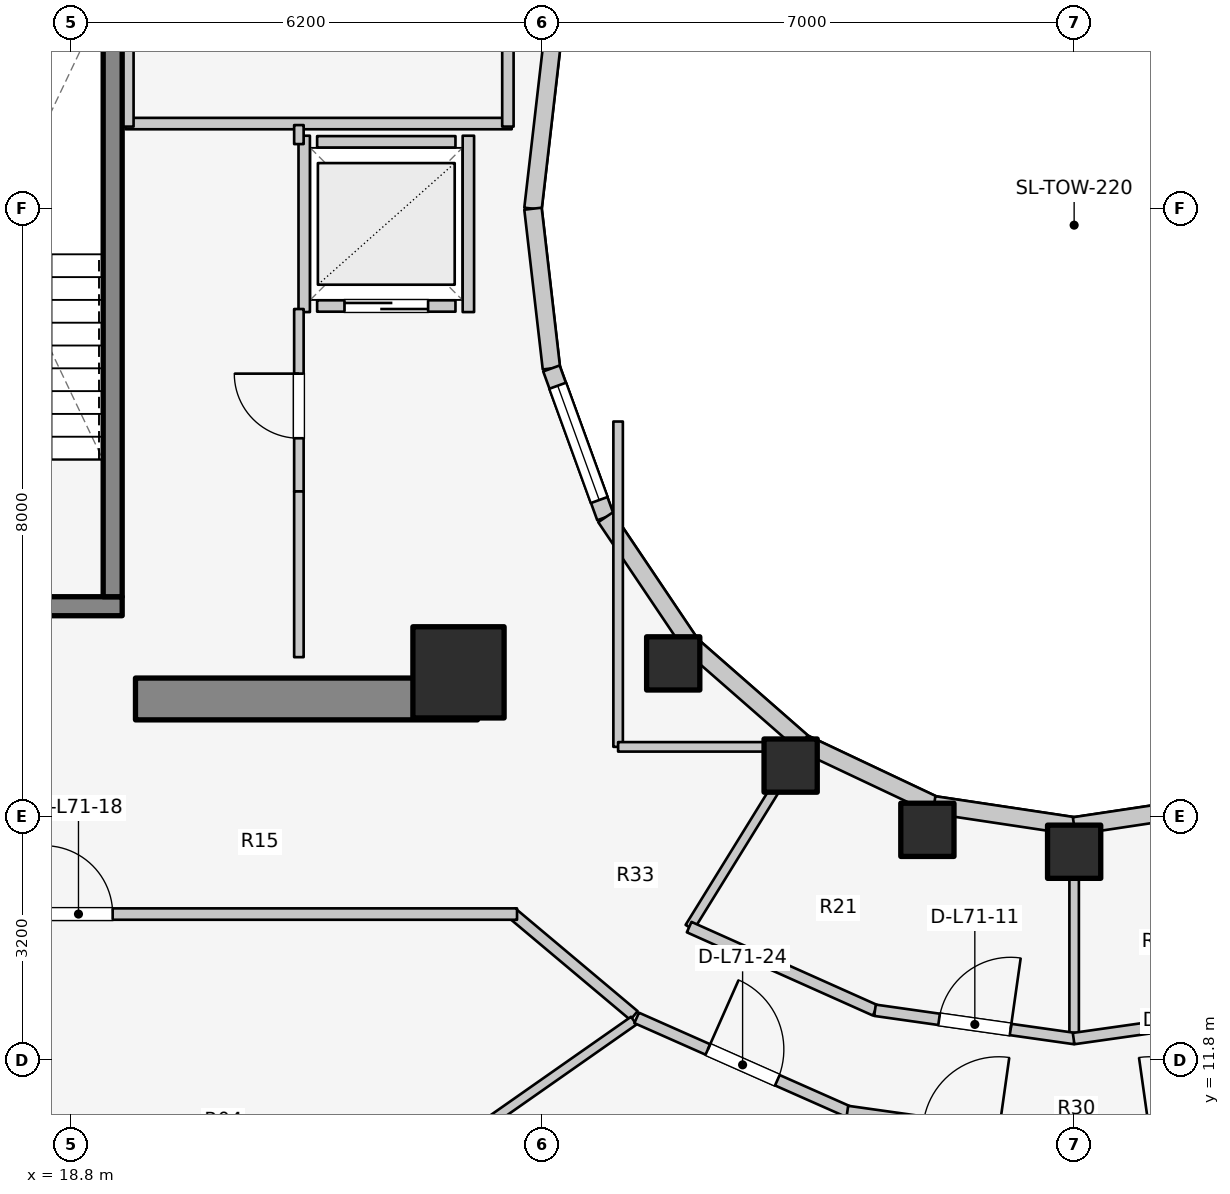
"""IFC4 building model, lengths in metres.
Left out: names, types, materials, properties, quantities, classifications, styles, units other than length and angle.
Written with IfcOpenShell. Run it as: python <this file> out.ifc"""

import sys

from ifc_helpers import new_model, si_unit, direction, frame, frame_2d, origin, origin_2d, place, context, subcontext, project, spatial, rectangle, extrude, element, fill, save


model = new_model("IFC4")
c1 = context("Model", 3, precision=1e-05, world=origin(), true_north=direction((0.0, 1.0)))
c2 = subcontext(c1, "Body", "Model", "MODEL_VIEW")
j1 = project(units=[si_unit("LENGTHUNIT", "METRE"), si_unit("PLANEANGLEUNIT", "RADIAN")], contexts=[c1])
p1 = place(None, origin())
s1 = spatial("IfcSite", under=j1, at=p1, CompositionType="ELEMENT")
p2 = place(p1, origin())
s2 = spatial("IfcBuilding", under=s1, at=p2, CompositionType="ELEMENT")
p3 = place(p2, frame((0.0, 0.0, 232.6)))
s3 = spatial("IfcBuildingStorey", under=s2, at=p3, CompositionType="ELEMENT", Elevation=232.6)
p4 = place(p3, frame((19.65, 16.55, 0.0), z_axis=(0.0, 0.0, 1.0), x_axis=(1.0, 0.0, 0.0)))
e1 = element("IfcWall", 1, at=p4, inside=s3, PredefinedType="SHEAR", context=c2, shape_type="SweptSolid", body=[
    extrude(rectangle(XDim=4.5, YDim=0.55, at=frame_2d((2.25, 0.0))), origin(), (0.0, 0.0, 1.0), 3.1),
])
p5 = place(p3, frame((16.105, 17.77, 0.0), z_axis=(0.0, 0.0, 1.0), x_axis=(1.0, 0.0, 0.0)))
e2 = element("IfcWall", 2, at=p5, inside=s3, PredefinedType="SOLIDWALL", context=c2, shape_type="SweptSolid", body=[
    extrude(rectangle(XDim=3.37, YDim=0.25, at=frame_2d((1.685, 0.0))), origin(), (0.0, 0.0, 1.0), 3.1),
])
p6 = place(p5, frame((1.135, 0.0, 0.0)))
e3 = element("IfcOpeningElement", 3, at=p6, cuts=e2, PredefinedType="OPENING", context=c2, shape_type="SweptSolid", body=[
    extrude(rectangle(XDim=1.1, YDim=2.1, at=frame_2d((0.55, 1.05))), frame((0.0, 0.135, 0.0), z_axis=(0.0, -1.0, 0.0), x_axis=(1.0, 0.0, 0.0)), (0.0, 0.0, 1.0), 0.27),
])
p7 = place(p3, frame((19.35, 17.895, 0.0), z_axis=(0.0, 0.0, 1.0), x_axis=(0.0, 1.0, 0.0)))
e4 = element("IfcWall", 4, at=p7, inside=s3, PredefinedType="SOLIDWALL", context=c2, shape_type="SweptSolid", body=[
    extrude(rectangle(XDim=7.81, YDim=0.25, at=frame_2d((3.905, 0.0))), origin(), (0.0, 0.0, 1.0), 3.1),
])
p8 = place(p3, frame((23.9, 16.9, 0.0), z_axis=(0.0, 0.0, 1.0), x_axis=(1.0, 0.0, 0.0)))
e5 = element("IfcColumn", 5, at=p8, inside=s3, PredefinedType="COLUMN", context=c2, shape_type="SweptSolid", body=[
    extrude(rectangle(XDim=1.2, YDim=1.2, at=origin_2d()), origin(), (0.0, 0.0, 1.0), 3.1),
])
for number, where, z_axis, x_axis in (
    (6, (26.725, 17.018, 0.0), (0.0, 0.0, 1.0), (1.0, 0.0, 0.0)),
    (7, (28.27, 15.673, 0.0), (0.0, 0.0, 1.0), (1.0, 0.0, 0.0)),
    (8, (30.069, 14.828, 0.0), (0.0, 0.0, 1.0), (1.0, 0.0, 0.0)),
    (9, (32.0, 14.54, 0.0), (0.0, 0.0, 1.0), (1.0, 0.0, 0.0)),
):
    element("IfcColumn", number, at=place(p3, frame(where, z_axis=z_axis, x_axis=x_axis)), inside=s3, PredefinedType="COLUMN", context=c2, shape_type="SweptSolid", body=[
        extrude(rectangle(XDim=0.7, YDim=0.7, at=origin_2d()), origin(), (0.0, 0.0, 1.0), 3.1),
    ])
for number, where, z_axis, x_axis in (
    (10, (25.123, 25.102, 0.0), (0.0, 0.0, 1.0), (-0.115, -0.993, 0.0)),
    (11, (24.88, 23.0, 0.0), (0.0, 0.0, 1.0), (0.115, -0.993, 0.0)),
):
    element("IfcWall", number, at=place(p3, frame(where, z_axis=z_axis, x_axis=x_axis)), inside=s3, PredefinedType="STANDARD", context=c2, shape_type="SweptSolid", body=[
        extrude(rectangle(XDim=2.115, YDim=0.23, at=frame_2d((1.058, 0.0))), origin(), (0.0, 0.0, 1.0), 2.84),
    ])
p9 = place(p3, frame((25.123, 20.898, 0.0), z_axis=(0.0, 0.0, 1.0), x_axis=(0.341423187295, -0.93990968033, 0.0)))
e12 = element("IfcWall", 12, at=p9, inside=s3, PredefinedType="STANDARD", context=c2, shape_type="SweptSolid", body=[
    extrude(rectangle(XDim=2.084, YDim=0.23, at=frame_2d((1.042, 0.0))), origin(), (0.0, 0.0, 1.0), 2.84),
])
p10 = place(p9, frame((0.242, 0.0, 0.85)))
e13 = element("IfcOpeningElement", 13, at=p10, cuts=e12, PredefinedType="OPENING", context=c2, shape_type="SweptSolid", body=[
    extrude(rectangle(XDim=1.6, YDim=1.65, at=frame_2d((0.8, 0.825))), frame((0.0, 0.125, 0.0), z_axis=(0.0, -1.0, 0.0), x_axis=(1.0, 0.0, 0.0)), (0.0, 0.0, 1.0), 0.25),
])
p11 = place(p3, frame((25.834, 18.94, 0.0), z_axis=(0.0, 0.0, 1.0), x_axis=(0.558197800898, -0.829707909492, 0.0)))
e14 = element("IfcWall", 14, at=p11, inside=s3, PredefinedType="STANDARD", context=c2, shape_type="SweptSolid", body=[
    extrude(rectangle(XDim=2.027, YDim=0.23, at=frame_2d((1.013, 0.0))), origin(), (0.0, 0.0, 1.0), 2.16),
])
p12 = place(p3, frame((26.965, 17.258, 0.0), z_axis=(0.0, 0.0, 1.0), x_axis=(0.752576694707, -0.658504607869, 0.0)))
e15 = element("IfcWall", 15, at=p12, inside=s3, PredefinedType="STANDARD", context=c2, shape_type="SweptSolid", body=[
    extrude(rectangle(XDim=1.959, YDim=0.23, at=frame_2d((0.98, 0.0))), origin(), (0.0, 0.0, 1.0), 2.16),
])
p13 = place(p3, frame((28.44, 15.968, 0.0), z_axis=(0.0, 0.0, 1.0), x_axis=(0.904179699603, -0.427152280606, 0.0)))
e16 = element("IfcWall", 16, at=p13, inside=s3, PredefinedType="STANDARD", context=c2, shape_type="SweptSolid", body=[
    extrude(rectangle(XDim=1.899, YDim=0.23, at=frame_2d((0.95, 0.0))), origin(), (0.0, 0.0, 1.0), 2.16),
])
for number, where, z_axis, x_axis in (
    (17, (30.157, 15.157, 0.0), (0.0, 0.0, 1.0), (0.989, -0.149, 0.0)),
    (18, (32.0, 14.88, 0.0), (0.0, 0.0, 1.0), (0.989, 0.149, 0.0)),
):
    element("IfcWall", number, at=place(p3, frame(where, z_axis=z_axis, x_axis=x_axis)), inside=s3, PredefinedType="STANDARD", context=c2, shape_type="SweptSolid", body=[
        extrude(rectangle(XDim=1.864, YDim=0.23, at=frame_2d((0.932, 0.0))), origin(), (0.0, 0.0, 1.0), 2.16),
    ])
p14 = place(p3, frame((22.04, 21.72, 0.0), z_axis=(0.0, 0.0, 1.0), x_axis=(1.0, 0.0, 0.0)))
e19 = element("IfcWall", 19, at=p14, inside=s3, PredefinedType="SOLIDWALL", context=c2, shape_type="SweptSolid", body=[
    extrude(rectangle(XDim=1.82, YDim=0.15, at=frame_2d((0.91, 0.0))), origin(), (0.0, 0.0, 1.0), 2.12),
])
p15 = place(p14, frame((0.36, 0.0, 0.0)))
e20 = element("IfcOpeningElement", 20, at=p15, cuts=e19, PredefinedType="OPENING", context=c2, shape_type="SweptSolid", body=[
    extrude(rectangle(XDim=1.1, YDim=2.1, at=frame_2d((0.55, 1.05))), frame((0.0, 0.085, 0.0), z_axis=(0.0, -1.0, 0.0), x_axis=(1.0, 0.0, 0.0)), (0.0, 0.0, 1.0), 0.17),
])
p16 = place(p3, frame((22.04, 23.88, 0.0), z_axis=(0.0, 0.0, 1.0), x_axis=(1.0, 0.0, 0.0)))
e21 = element("IfcWall", 21, at=p16, inside=s3, PredefinedType="SOLIDWALL", context=c2, shape_type="SweptSolid", body=[
    extrude(rectangle(XDim=1.82, YDim=0.15, at=frame_2d((0.91, 0.0))), origin(), (0.0, 0.0, 1.0), 2.12),
])
p17 = place(p3, frame((21.87, 21.64, 0.0), z_axis=(0.0, 0.0, 1.0), x_axis=(0.0, 1.0, 0.0)))
e22 = element("IfcWall", 22, at=p17, inside=s3, PredefinedType="SOLIDWALL", context=c2, shape_type="SweptSolid", body=[
    extrude(rectangle(XDim=2.32, YDim=0.15, at=frame_2d((1.16, 0.0))), origin(), (0.0, 0.0, 1.0), 2.855),
])
p18 = place(p3, frame((24.03, 21.64, 0.0), z_axis=(0.0, 0.0, 1.0), x_axis=(0.0, 1.0, 0.0)))
e23 = element("IfcWall", 23, at=p18, inside=s3, PredefinedType="SOLIDWALL", context=c2, shape_type="SweptSolid", body=[
    extrude(rectangle(XDim=2.32, YDim=0.15, at=frame_2d((1.16, 0.0))), origin(), (0.0, 0.0, 1.0), 2.12),
])
p19 = place(p3, frame((19.52, 24.12, 0.0), z_axis=(0.0, 0.0, 1.0), x_axis=(1.0, 0.0, 0.0)))
e24 = element("IfcWall", 24, at=p19, inside=s3, PredefinedType="PARTITIONING", context=c2, shape_type="SweptSolid", body=[
    extrude(rectangle(XDim=5.08, YDim=0.15, at=frame_2d((2.54, 0.0))), origin(), (0.0, 0.0, 1.0), 2.12),
])
p20 = place(p3, frame((19.55, 24.08, 0.0), z_axis=(0.0, 0.0, 1.0), x_axis=(0.0, 1.0, 0.0)))
e25 = element("IfcWall", 25, at=p20, inside=s3, PredefinedType="PARTITIONING", context=c2, shape_type="SweptSolid", body=[
    extrude(rectangle(XDim=3.2, YDim=0.15, at=frame_2d((1.6, 0.0))), origin(), (0.0, 0.0, 1.0), 2.855),
])
p21 = place(p3, frame((24.55, 24.08, 0.0), z_axis=(0.0, 0.0, 1.0), x_axis=(0.0, 1.0, 0.0)))
e26 = element("IfcWall", 26, at=p21, inside=s3, PredefinedType="PARTITIONING", context=c2, shape_type="SweptSolid", body=[
    extrude(rectangle(XDim=3.4, YDim=0.15, at=frame_2d((1.7, 0.0))), origin(), (0.0, 0.0, 1.0), 2.855),
])
p22 = place(p21, frame((1.894, 0.0, 0.0)))
e27 = element("IfcOpeningElement", 27, at=p22, cuts=e26, PredefinedType="OPENING", context=c2, shape_type="SweptSolid", body=[
    extrude(rectangle(XDim=1.1, YDim=2.1, at=frame_2d((0.55, 1.05))), frame((0.0, 0.085, 0.0), z_axis=(0.0, -1.0, 0.0), x_axis=(1.0, 0.0, 0.0)), (0.0, 0.0, 1.0), 0.17),
])
p23 = place(p3, frame((21.8, 19.28, 0.0), z_axis=(0.0, 0.0, 1.0), x_axis=(0.0, 1.0, 0.0)))
e28 = element("IfcWall", 28, at=p23, inside=s3, PredefinedType="PARTITIONING", context=c2, shape_type="SweptSolid", body=[
    extrude(rectangle(XDim=2.4, YDim=0.125, at=frame_2d((1.2, 0.0))), origin(), (0.0, 0.0, 1.0), 2.855),
])
p24 = place(p23, frame((0.7, 0.0, 0.0)))
e29 = element("IfcOpeningElement", 29, at=p24, cuts=e28, PredefinedType="OPENING", context=c2, shape_type="SweptSolid", body=[
    extrude(rectangle(XDim=0.85, YDim=2.05, at=frame_2d((0.425, 1.025))), frame((0.0, 0.073, 0.0), z_axis=(0.0, -1.0, 0.0), x_axis=(1.0, 0.0, 0.0)), (0.0, 0.0, 1.0), 0.145),
])
p25 = place(p3, frame((21.8, 23.85, 0.0), z_axis=(0.0, 0.0, 1.0), x_axis=(0.0, 1.0, 0.0)))
e30 = element("IfcWall", 30, at=p25, inside=s3, PredefinedType="PARTITIONING", context=c2, shape_type="SweptSolid", body=[
    extrude(rectangle(XDim=0.25, YDim=0.125, at=frame_2d((0.125, 0.0))), origin(), (0.0, 0.0, 1.0), 2.855),
])
p26 = place(p3, frame((21.8, 17.1, 0.0), z_axis=(0.0, 0.0, 1.0), x_axis=(0.0, 1.0, 0.0)))
e31 = element("IfcWall", 31, at=p26, inside=s3, PredefinedType="PARTITIONING", context=c2, shape_type="SweptSolid", body=[
    extrude(rectangle(XDim=2.18, YDim=0.125, at=frame_2d((1.09, 0.0))), origin(), (0.0, 0.0, 1.0), 2.855),
])
p27 = place(p3, frame((28.45, 15.985, 0.0), z_axis=(0.0, 0.0, 1.0), x_axis=(-0.52592395012, -0.850531597702, 0.0)))
e32 = element("IfcWall", 32, at=p27, inside=s3, PredefinedType="PARTITIONING", context=c2, shape_type="SweptSolid", body=[
    extrude(rectangle(XDim=2.869, YDim=0.125, at=frame_2d((1.435, 0.0))), origin(), (0.0, 0.0, 1.0), 2.376),
])
p28 = place(p3, frame((32.0, 14.9, 0.0), z_axis=(0.0, 0.0, 1.0), x_axis=(0.0, -1.0, 0.0)))
e33 = element("IfcWall", 33, at=p28, inside=s3, PredefinedType="PARTITIONING", context=c2, shape_type="SweptSolid", body=[
    extrude(rectangle(XDim=2.818, YDim=0.125, at=frame_2d((1.409, 0.0))), origin(), (0.0, 0.0, 1.0), 2.376),
])
p29 = place(p3, frame((26.935, 13.549, 0.0), z_axis=(0.0, 0.0, 1.0), x_axis=(0.912859324183, -0.408274239027, 0.0)))
e34 = element("IfcWall", 34, at=p29, inside=s3, PredefinedType="PARTITIONING", context=c2, shape_type="SweptSolid", body=[
    extrude(rectangle(XDim=2.682, YDim=0.15, at=frame_2d((1.341, 0.0))), origin(), (0.0, 0.0, 1.0), 2.376),
])
p30 = place(p3, frame((29.38, 12.455, 0.0), z_axis=(0.0, 0.0, 1.0), x_axis=(0.990096156252, -0.140390887794, 0.0)))
e35 = element("IfcWall", 35, at=p30, inside=s3, PredefinedType="PARTITIONING", context=c2, shape_type="SweptSolid", body=[
    extrude(rectangle(XDim=2.654, YDim=0.15, at=frame_2d((1.327, 0.0))), origin(), (0.0, 0.0, 1.0), 2.376),
])
p31 = place(p30, frame((0.852, 0.0, 0.0)))
e36 = element("IfcOpeningElement", 36, at=p31, cuts=e35, PredefinedType="OPENING", context=c2, shape_type="SweptSolid", body=[
    extrude(rectangle(XDim=0.95, YDim=2.1, at=frame_2d((0.475, 1.05))), frame((0.0, 0.085, 0.0), z_axis=(0.0, -1.0, 0.0), x_axis=(1.0, 0.0, 0.0)), (0.0, 0.0, 1.0), 0.17),
])
p32 = place(p3, frame((31.993, 12.082, 0.0), z_axis=(0.0, 0.0, 1.0), x_axis=(0.990096156252, 0.140390887794, 0.0)))
e37 = element("IfcWall", 37, at=p32, inside=s3, PredefinedType="PARTITIONING", context=c2, shape_type="SweptSolid", body=[
    extrude(rectangle(XDim=2.654, YDim=0.15, at=frame_2d((1.327, 0.0))), origin(), (0.0, 0.0, 1.0), 2.376),
])
p33 = place(p3, frame((26.0, 15.92, 0.0), z_axis=(0.0, 0.0, 1.0), x_axis=(0.0, 1.0, 0.0)))
e38 = element("IfcWall", 38, at=p33, inside=s3, PredefinedType="PARTITIONING", context=c2, shape_type="SweptSolid", body=[
    extrude(rectangle(XDim=4.28, YDim=0.125, at=frame_2d((2.14, 0.0))), origin(), (0.0, 0.0, 1.0), 2.232),
])
p34 = place(p3, frame((26.0, 15.92, 0.0), z_axis=(0.0, 0.0, 1.0), x_axis=(1.0, 0.0, 0.0)))
e39 = element("IfcWall", 39, at=p34, inside=s3, PredefinedType="PARTITIONING", context=c2, shape_type="SweptSolid", body=[
    extrude(rectangle(XDim=2.6, YDim=0.125, at=frame_2d((1.3, 0.0))), origin(), (0.0, 0.0, 1.0), 2.232),
])
p35 = place(p3, frame((26.209, 12.385, 0.0), z_axis=(0.0, 0.0, 1.0), x_axis=(-0.765677451641, 0.643224719711, 0.0)))
e40 = element("IfcWall", 40, at=p35, inside=s3, PredefinedType="PARTITIONING", context=c2, shape_type="SweptSolid", body=[
    extrude(rectangle(XDim=2.105, YDim=0.15, at=frame_2d((1.053, 0.0))), origin(), (0.0, 0.0, 1.0), 2.376),
])
p36 = place(p3, frame((17.15, 13.72, 0.0), z_axis=(0.0, 0.0, 1.0), x_axis=(1.0, 0.0, 0.0)))
e41 = element("IfcWall", 41, at=p36, inside=s3, PredefinedType="PARTITIONING", context=c2, shape_type="SweptSolid", body=[
    extrude(rectangle(XDim=7.52, YDim=0.15, at=frame_2d((3.76, 0.0))), origin(), (0.0, 0.0, 1.0), 2.376),
])
p37 = place(p36, frame((1.3, 0.0, 0.0)))
e42 = element("IfcOpeningElement", 42, at=p37, cuts=e41, PredefinedType="OPENING", context=c2, shape_type="SweptSolid", body=[
    extrude(rectangle(XDim=0.9, YDim=2.1, at=frame_2d((0.45, 1.05))), frame((0.0, 0.085, 0.0), z_axis=(0.0, -1.0, 0.0), x_axis=(1.0, 0.0, 0.0)), (0.0, 0.0, 1.0), 0.17),
])
p38 = place(p3, frame((26.206, 12.318, 0.0), z_axis=(0.0, 0.0, 1.0), x_axis=(-0.819017716307, -0.573768228796, 0.0)))
e43 = element("IfcWall", 43, at=p38, inside=s3, PredefinedType="PARTITIONING", context=c2, shape_type="SweptSolid", body=[
    extrude(rectangle(XDim=6.802, YDim=0.125, at=frame_2d((3.401, 0.0))), origin(), (0.0, 0.0, 1.0), 2.376),
])
p39 = place(p3, frame((28.992, 11.077, 0.0), z_axis=(0.0, 0.0, 1.0), x_axis=(-0.590771495169, -0.806838918555, 0.0)))
e44 = element("IfcWall", 44, at=p39, inside=s3, PredefinedType="PARTITIONING", context=c2, shape_type="SweptSolid", body=[
    extrude(rectangle(XDim=6.347, YDim=0.125, at=frame_2d((3.173, 0.0))), origin(), (0.0, 0.0, 1.0), 2.376),
])
p40 = place(p3, frame((26.244, 12.354, 0.0), z_axis=(0.0, 0.0, 1.0), x_axis=(0.914302802833, -0.405031337963, 0.0)))
e45 = element("IfcWall", 45, at=p40, inside=s3, PredefinedType="PARTITIONING", context=c2, shape_type="SweptSolid", body=[
    extrude(rectangle(XDim=3.049, YDim=0.15, at=frame_2d((1.525, 0.0))), origin(), (0.0, 0.0, 1.0), 2.376),
])
p41 = place(p40, frame((1.025, 0.0, 0.0)))
e46 = element("IfcOpeningElement", 46, at=p41, cuts=e45, PredefinedType="OPENING", context=c2, shape_type="SweptSolid", body=[
    extrude(rectangle(XDim=1.0, YDim=2.1, at=frame_2d((0.5, 1.05))), frame((0.0, 0.085, 0.0), z_axis=(0.0, -1.0, 0.0), x_axis=(1.0, 0.0, 0.0)), (0.0, 0.0, 1.0), 0.17),
])
p42 = place(p3, frame((29.016, 11.123, 0.0), z_axis=(0.0, 0.0, 1.0), x_axis=(0.990225561979, -0.139475217886, 0.0)))
e47 = element("IfcWall", 47, at=p42, inside=s3, PredefinedType="PARTITIONING", context=c2, shape_type="SweptSolid", body=[
    extrude(rectangle(XDim=3.021, YDim=0.15, at=frame_2d((1.511, 0.0))), origin(), (0.0, 0.0, 1.0), 2.376),
])
p43 = place(p42, frame((1.01, 0.0, 0.0)))
e48 = element("IfcOpeningElement", 48, at=p43, cuts=e47, PredefinedType="OPENING", context=c2, shape_type="SweptSolid", body=[
    extrude(rectangle(XDim=1.0, YDim=2.1, at=frame_2d((0.5, 1.05))), frame((0.0, 0.085, 0.0), z_axis=(0.0, -1.0, 0.0), x_axis=(1.0, 0.0, 0.0)), (0.0, 0.0, 1.0), 0.17),
])
p44 = place(p3, frame((31.992, 10.702, 0.0), z_axis=(0.0, 0.0, 1.0), x_axis=(0.990225561979, 0.139475217886, 0.0)))
e49 = element("IfcWall", 49, at=p44, inside=s3, PredefinedType="PARTITIONING", context=c2, shape_type="SweptSolid", body=[
    extrude(rectangle(XDim=3.021, YDim=0.15, at=frame_2d((1.511, 0.0))), origin(), (0.0, 0.0, 1.0), 2.376),
])
p45 = place(p44, frame((1.01, 0.0, 0.0)))
e50 = element("IfcOpeningElement", 50, at=p45, cuts=e49, PredefinedType="OPENING", context=c2, shape_type="SweptSolid", body=[
    extrude(rectangle(XDim=1.0, YDim=2.1, at=frame_2d((0.5, 1.05))), frame((0.0, 0.085, 0.0), z_axis=(0.0, -1.0, 0.0), x_axis=(1.0, 0.0, 0.0)), (0.0, 0.0, 1.0), 0.17),
])
p46 = place(p10, origin())
e51 = element("IfcWindow", 51, at=p46, inside=s3, PartitioningType="SINGLE_PANEL", PredefinedType="WINDOW", context=c2, shape_type="SweptSolid", body=[
    extrude(rectangle(XDim=1.6, YDim=1.65, at=frame_2d((0.8, 0.825))), frame((0.0, 0.03, 0.0), z_axis=(0.0, -1.0, 0.0), x_axis=(1.0, 0.0, 0.0)), (0.0, 0.0, 1.0), 0.06),
])
fill(e13, e51)
p47 = place(p15, origin())
e52 = element("IfcDoor", 52, at=p47, inside=s3, OperationType="DOUBLE_DOOR_SLIDING", PredefinedType="DOOR", context=c2, shape_type="SweptSolid", body=[
    extrude(rectangle(XDim=1.1, YDim=2.1, at=frame_2d((0.55, 1.05))), frame((0.0, 0.025, 0.0), z_axis=(0.0, -1.0, 0.0), x_axis=(1.0, 0.0, 0.0)), (0.0, 0.0, 1.0), 0.05),
])
fill(e20, e52)
p48 = place(p24, origin())
e53 = element("IfcDoor", 53, at=p48, inside=s3, OperationType="SINGLE_SWING_RIGHT", PredefinedType="DOOR", context=c2, shape_type="SweptSolid", body=[
    extrude(rectangle(XDim=0.85, YDim=2.05, at=frame_2d((0.425, 1.025))), frame((0.0, 0.025, 0.0), z_axis=(0.0, -1.0, 0.0), x_axis=(1.0, 0.0, 0.0)), (0.0, 0.0, 1.0), 0.05),
])
fill(e29, e53)
p49 = place(p31, origin())
e54 = element("IfcDoor", 54, at=p49, inside=s3, OperationType="SINGLE_SWING_RIGHT", PredefinedType="DOOR", context=c2, shape_type="SweptSolid", body=[
    extrude(rectangle(XDim=0.95, YDim=2.1, at=frame_2d((0.475, 1.05))), frame((0.0, 0.025, 0.0), z_axis=(0.0, -1.0, 0.0), x_axis=(1.0, 0.0, 0.0)), (0.0, 0.0, 1.0), 0.05),
])
fill(e36, e54)
p50 = place(p37, origin())
e55 = element("IfcDoor", 55, at=p50, inside=s3, OperationType="SINGLE_SWING_LEFT", PredefinedType="DOOR", context=c2, shape_type="SweptSolid", body=[
    extrude(rectangle(XDim=0.9, YDim=2.1, at=frame_2d((0.45, 1.05))), frame((0.0, 0.025, 0.0), z_axis=(0.0, -1.0, 0.0), x_axis=(1.0, 0.0, 0.0)), (0.0, 0.0, 1.0), 0.05),
])
fill(e42, e55)
p51 = place(p41, origin())
e56 = element("IfcDoor", 56, at=p51, inside=s3, OperationType="SINGLE_SWING_LEFT", PredefinedType="DOOR", context=c2, shape_type="SweptSolid", body=[
    extrude(rectangle(XDim=1.0, YDim=2.1, at=frame_2d((0.5, 1.05))), frame((0.0, 0.025, 0.0), z_axis=(0.0, -1.0, 0.0), x_axis=(1.0, 0.0, 0.0)), (0.0, 0.0, 1.0), 0.05),
])
fill(e46, e56)
save(model, sys.argv[1])
